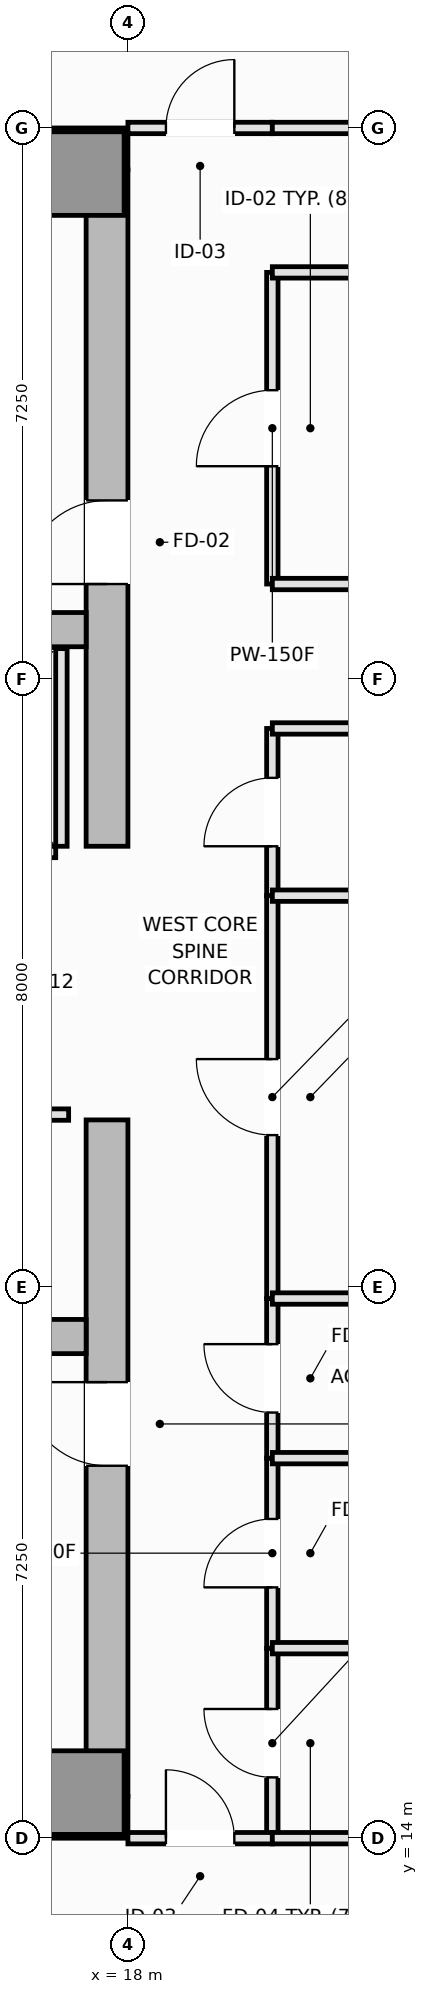
"""IFC4 building model, lengths in metres.
Left out: names, types, materials, properties, quantities, classifications, styles, units other than length and angle.
Written with IfcOpenShell. Run it as: python <this file> out.ifc"""

import sys

from ifc_helpers import new_model, si_unit, direction, frame, frame_2d, origin, origin_2d, place, context, subcontext, project, spatial, rectangle, extrude, element, fill, save


model = new_model("IFC4")
c1 = context("Model", 3, precision=1e-05, world=origin(), true_north=direction((0.0, 1.0)))
c2 = subcontext(c1, "Body", "Model", "MODEL_VIEW")
j1 = project(units=[si_unit("LENGTHUNIT", "METRE"), si_unit("PLANEANGLEUNIT", "RADIAN")], contexts=[c1])
p1 = place(None, origin())
s1 = spatial("IfcSite", under=j1, at=p1, CompositionType="ELEMENT")
p2 = place(p1, origin())
s2 = spatial("IfcBuilding", under=s1, at=p2, CompositionType="ELEMENT")
p3 = place(p2, frame((0.0, 0.0, 234.2)))
s3 = spatial("IfcBuildingStorey", under=s2, at=p3, CompositionType="ELEMENT", Elevation=234.2)
for number, where, z_axis, x_axis in (
    (1, (4.5, 14.275, 0.0), (0.0, 0.0, 1.0), (1.0, 0.0, 0.0)),
    (2, (4.5, 36.225, 0.0), (0.0, 0.0, 1.0), (1.0, 0.0, 0.0)),
):
    element("IfcWall", number, at=place(p3, frame(where, z_axis=z_axis, x_axis=x_axis)), inside=s3, PredefinedType="SHEAR", context=c2, shape_type="SweptSolid", body=[
        extrude(rectangle(XDim=13.5, YDim=0.55, at=frame_2d((6.75, 0.0))), origin(), (0.0, 0.0, 1.0), 3.55),
    ])
p4 = place(p3, frame((17.725, 14.55, 0.0), z_axis=(0.0, 0.0, 1.0), x_axis=(0.0, 1.0, 0.0)))
e3 = element("IfcWall", 3, at=p4, inside=s3, PredefinedType="SHEAR", context=c2, shape_type="SweptSolid", body=[
    extrude(rectangle(XDim=8.9, YDim=0.55, at=frame_2d((4.45, 0.0))), origin(), (0.0, 0.0, 1.0), 3.55),
])
p5 = place(p4, frame((4.35, 0.0, 0.0)))
e4 = element("IfcOpeningElement", 4, at=p5, cuts=e3, PredefinedType="OPENING", context=c2, shape_type="SweptSolid", body=[
    extrude(rectangle(XDim=1.1, YDim=2.15, at=frame_2d((0.55, 1.075))), frame((0.0, 0.285, 0.0), z_axis=(0.0, -1.0, 0.0), x_axis=(1.0, 0.0, 0.0)), (0.0, 0.0, 1.0), 0.57),
])
p6 = place(p3, frame((17.725, 27.05, 0.0), z_axis=(0.0, 0.0, 1.0), x_axis=(0.0, 1.0, 0.0)))
e5 = element("IfcWall", 5, at=p6, inside=s3, PredefinedType="SHEAR", context=c2, shape_type="SweptSolid", body=[
    extrude(rectangle(XDim=8.9, YDim=0.55, at=frame_2d((4.45, 0.0))), origin(), (0.0, 0.0, 1.0), 3.55),
])
p7 = place(p6, frame((3.45, 0.0, 0.0)))
e6 = element("IfcOpeningElement", 6, at=p7, cuts=e5, PredefinedType="OPENING", context=c2, shape_type="SweptSolid", body=[
    extrude(rectangle(XDim=1.1, YDim=2.15, at=frame_2d((0.55, 1.075))), frame((0.0, 0.285, 0.0), z_axis=(0.0, -1.0, 0.0), x_axis=(1.0, 0.0, 0.0)), (0.0, 0.0, 1.0), 0.57),
])
for number, where, z_axis, x_axis in (
    (7, (5.05, 20.6, 0.0), (0.0, 0.0, 1.0), (1.0, 0.0, 0.0)),
    (8, (5.05, 29.9, 0.0), (0.0, 0.0, 1.0), (1.0, 0.0, 0.0)),
):
    element("IfcWall", number, at=place(p3, frame(where, z_axis=z_axis, x_axis=x_axis)), inside=s3, PredefinedType="SHEAR", context=c2, shape_type="SweptSolid", body=[
        extrude(rectangle(XDim=12.4, YDim=0.45, at=frame_2d((6.2, 0.0))), origin(), (0.0, 0.0, 1.0), 3.55),
    ])
for number, where, z_axis, x_axis in (
    (9, (17.4, 14.6, 0.0), (0.0, 0.0, 1.0), (1.0, 0.0, 0.0)),
    (10, (17.4, 35.9, 0.0), (0.0, 0.0, 1.0), (1.0, 0.0, 0.0)),
):
    element("IfcColumn", number, at=place(p3, frame(where, z_axis=z_axis, x_axis=x_axis)), inside=s3, PredefinedType="PILASTER", context=c2, shape_type="SweptSolid", body=[
        extrude(rectangle(XDim=1.1, YDim=1.1, at=origin_2d()), origin(), (0.0, 0.0, 1.0), 3.55),
    ])
p8 = place(p3, frame((14.5, 26.975, 0.0), z_axis=(0.0, 0.0, 1.0), x_axis=(1.0, 0.0, 0.0)))
e11 = element("IfcWall", 11, at=p8, inside=s3, PredefinedType="PARTITIONING", context=c2, shape_type="SweptSolid", body=[
    extrude(rectangle(XDim=2.55, YDim=0.15, at=frame_2d((1.275, 0.0))), origin(), (0.0, 0.0, 1.0), 3.37),
])
p9 = place(p8, frame((0.625, 0.0, 0.0)))
e12 = element("IfcOpeningElement", 12, at=p9, cuts=e11, PredefinedType="OPENING", context=c2, shape_type="SweptSolid", body=[
    extrude(rectangle(XDim=1.3, YDim=2.2, at=frame_2d((0.65, 1.1))), frame((0.0, 0.085, 0.0), z_axis=(0.0, -1.0, 0.0), x_axis=(1.0, 0.0, 0.0)), (0.0, 0.0, 1.0), 0.17),
])
p10 = place(p3, frame((17.125, 27.05, 0.0), z_axis=(0.0, 0.0, 1.0), x_axis=(0.0, 1.0, 0.0)))
e13 = element("IfcWall", 13, at=p10, inside=s3, PredefinedType="PARTITIONING", context=c2, shape_type="SweptSolid", body=[
    extrude(rectangle(XDim=2.6, YDim=0.15, at=frame_2d((1.3, 0.0))), origin(), (0.0, 0.0, 1.0), 3.37),
])
p11 = place(p3, frame((16.05, 23.52, 0.0), z_axis=(0.0, 0.0, 1.0), x_axis=(1.0, 0.0, 0.0)))
e14 = element("IfcWall", 14, at=p11, inside=s3, PredefinedType="PARTITIONING", context=c2, shape_type="SweptSolid", body=[
    extrude(rectangle(XDim=1.17, YDim=0.15, at=frame_2d((0.585, 0.0))), origin(), (0.0, 0.0, 1.0), 3.37),
])
p12 = place(p3, frame((19.9, 30.5, 0.0), z_axis=(0.0, 0.0, 1.0), x_axis=(0.0, 1.0, 0.0)))
e15 = element("IfcWall", 15, at=p12, inside=s3, PredefinedType="PARTITIONING", context=c2, shape_type="SweptSolid", body=[
    extrude(rectangle(XDim=4.1, YDim=0.15, at=frame_2d((2.05, 0.0))), origin(), (0.0, 0.0, 1.0), 3.37),
])
p13 = place(p12, frame((1.55, 0.0, 0.0)))
e16 = element("IfcOpeningElement", 16, at=p13, cuts=e15, PredefinedType="OPENING", context=c2, shape_type="SweptSolid", body=[
    extrude(rectangle(XDim=1.0, YDim=2.15, at=frame_2d((0.5, 1.075))), frame((0.0, 0.085, 0.0), z_axis=(0.0, -1.0, 0.0), x_axis=(1.0, 0.0, 0.0)), (0.0, 0.0, 1.0), 0.17),
])
p14 = place(p3, frame((19.9, 14.0, 0.0), z_axis=(0.0, 0.0, 1.0), x_axis=(0.0, 1.0, 0.0)))
e17 = element("IfcWall", 17, at=p14, inside=s3, PredefinedType="PLUMBINGWALL", context=c2, shape_type="SweptSolid", body=[
    extrude(rectangle(XDim=2.5, YDim=0.15, at=frame_2d((1.25, 0.0))), origin(), (0.0, 0.0, 1.0), 3.37),
])
p15 = place(p14, frame((0.8, 0.0, 0.0)))
e18 = element("IfcOpeningElement", 18, at=p15, cuts=e17, PredefinedType="OPENING", context=c2, shape_type="SweptSolid", body=[
    extrude(rectangle(XDim=0.9, YDim=2.1, at=frame_2d((0.45, 1.05))), frame((0.0, 0.085, 0.0), z_axis=(0.0, -1.0, 0.0), x_axis=(1.0, 0.0, 0.0)), (0.0, 0.0, 1.0), 0.17),
])
p16 = place(p3, frame((19.9, 16.5, 0.0), z_axis=(0.0, 0.0, 1.0), x_axis=(0.0, 1.0, 0.0)))
e19 = element("IfcWall", 19, at=p16, inside=s3, PredefinedType="PLUMBINGWALL", context=c2, shape_type="SweptSolid", body=[
    extrude(rectangle(XDim=2.5, YDim=0.15, at=frame_2d((1.25, 0.0))), origin(), (0.0, 0.0, 1.0), 3.37),
])
p17 = place(p16, frame((0.8, 0.0, 0.0)))
e20 = element("IfcOpeningElement", 20, at=p17, cuts=e19, PredefinedType="OPENING", context=c2, shape_type="SweptSolid", body=[
    extrude(rectangle(XDim=0.9, YDim=2.1, at=frame_2d((0.45, 1.05))), frame((0.0, 0.085, 0.0), z_axis=(0.0, -1.0, 0.0), x_axis=(1.0, 0.0, 0.0)), (0.0, 0.0, 1.0), 0.17),
])
p18 = place(p3, frame((19.9, 19.0, 0.0), z_axis=(0.0, 0.0, 1.0), x_axis=(0.0, 1.0, 0.0)))
e21 = element("IfcWall", 21, at=p18, inside=s3, PredefinedType="PLUMBINGWALL", context=c2, shape_type="SweptSolid", body=[
    extrude(rectangle(XDim=2.1, YDim=0.15, at=frame_2d((1.05, 0.0))), origin(), (0.0, 0.0, 1.0), 3.37),
])
p19 = place(p18, frame((0.6, 0.0, 0.0)))
e22 = element("IfcOpeningElement", 22, at=p19, cuts=e21, PredefinedType="OPENING", context=c2, shape_type="SweptSolid", body=[
    extrude(rectangle(XDim=0.9, YDim=2.1, at=frame_2d((0.45, 1.05))), frame((0.0, 0.085, 0.0), z_axis=(0.0, -1.0, 0.0), x_axis=(1.0, 0.0, 0.0)), (0.0, 0.0, 1.0), 0.17),
])
p20 = place(p3, frame((19.9, 26.4, 0.0), z_axis=(0.0, 0.0, 1.0), x_axis=(0.0, 1.0, 0.0)))
e23 = element("IfcWall", 23, at=p20, inside=s3, PredefinedType="PLUMBINGWALL", context=c2, shape_type="SweptSolid", body=[
    extrude(rectangle(XDim=2.2, YDim=0.15, at=frame_2d((1.1, 0.0))), origin(), (0.0, 0.0, 1.0), 3.37),
])
p21 = place(p20, frame((0.65, 0.0, 0.0)))
e24 = element("IfcOpeningElement", 24, at=p21, cuts=e23, PredefinedType="OPENING", context=c2, shape_type="SweptSolid", body=[
    extrude(rectangle(XDim=0.9, YDim=2.1, at=frame_2d((0.45, 1.05))), frame((0.0, 0.085, 0.0), z_axis=(0.0, -1.0, 0.0), x_axis=(1.0, 0.0, 0.0)), (0.0, 0.0, 1.0), 0.17),
])
p22 = place(p3, frame((19.9, 21.1, 0.0), z_axis=(0.0, 0.0, 1.0), x_axis=(0.0, 1.0, 0.0)))
e25 = element("IfcWall", 25, at=p22, inside=s3, PredefinedType="PARTITIONING", context=c2, shape_type="SweptSolid", body=[
    extrude(rectangle(XDim=5.3, YDim=0.15, at=frame_2d((2.65, 0.0))), origin(), (0.0, 0.0, 1.0), 3.37),
])
p23 = place(p22, frame((2.15, 0.0, 0.0)))
e26 = element("IfcOpeningElement", 26, at=p23, cuts=e25, PredefinedType="OPENING", context=c2, shape_type="SweptSolid", body=[
    extrude(rectangle(XDim=1.0, YDim=2.15, at=frame_2d((0.5, 1.075))), frame((0.0, 0.085, 0.0), z_axis=(0.0, -1.0, 0.0), x_axis=(1.0, 0.0, 0.0)), (0.0, 0.0, 1.0), 0.17),
])
p24 = place(p3, frame((18.0, 14.0, 0.0), z_axis=(0.0, 0.0, 1.0), x_axis=(1.0, 0.0, 0.0)))
e27 = element("IfcWall", 27, at=p24, inside=s3, PredefinedType="PARTITIONING", context=c2, shape_type="SweptSolid", body=[
    extrude(rectangle(XDim=1.9, YDim=0.15, at=frame_2d((0.95, 0.0))), origin(), (0.0, 0.0, 1.0), 3.37),
])
p25 = place(p24, frame((0.5, 0.0, 0.0)))
e28 = element("IfcOpeningElement", 28, at=p25, cuts=e27, PredefinedType="OPENING", context=c2, shape_type="SweptSolid", body=[
    extrude(rectangle(XDim=0.9, YDim=2.1, at=frame_2d((0.45, 1.05))), frame((0.0, 0.085, 0.0), z_axis=(0.0, -1.0, 0.0), x_axis=(1.0, 0.0, 0.0)), (0.0, 0.0, 1.0), 0.17),
])
p26 = place(p3, frame((18.0, 36.5, 0.0), z_axis=(0.0, 0.0, 1.0), x_axis=(1.0, 0.0, 0.0)))
e29 = element("IfcWall", 29, at=p26, inside=s3, PredefinedType="PARTITIONING", context=c2, shape_type="SweptSolid", body=[
    extrude(rectangle(XDim=1.9, YDim=0.15, at=frame_2d((0.95, 0.0))), origin(), (0.0, 0.0, 1.0), 3.37),
])
p27 = place(p26, frame((0.5, 0.0, 0.0)))
e30 = element("IfcOpeningElement", 30, at=p27, cuts=e29, PredefinedType="OPENING", context=c2, shape_type="SweptSolid", body=[
    extrude(rectangle(XDim=0.9, YDim=2.1, at=frame_2d((0.45, 1.05))), frame((0.0, 0.085, 0.0), z_axis=(0.0, -1.0, 0.0), x_axis=(1.0, 0.0, 0.0)), (0.0, 0.0, 1.0), 0.17),
])
p28 = place(p3, frame((19.9, 30.5, 0.0), z_axis=(0.0, 0.0, 1.0), x_axis=(1.0, 0.0, 0.0)))
e31 = element("IfcWall", 31, at=p28, inside=s3, PredefinedType="PARTITIONING", context=c2, shape_type="SweptSolid", body=[
    extrude(rectangle(XDim=5.75, YDim=0.15, at=frame_2d((2.875, 0.0))), origin(), (0.0, 0.0, 1.0), 3.37),
])
p29 = place(p3, frame((19.9, 28.6, 0.0), z_axis=(0.0, 0.0, 1.0), x_axis=(1.0, 0.0, 0.0)))
e32 = element("IfcWall", 32, at=p29, inside=s3, PredefinedType="PLUMBINGWALL", context=c2, shape_type="SweptSolid", body=[
    extrude(rectangle(XDim=3.6, YDim=0.15, at=frame_2d((1.8, 0.0))), origin(), (0.0, 0.0, 1.0), 3.37),
])
p30 = place(p3, frame((19.9, 34.6, 0.0), z_axis=(0.0, 0.0, 1.0), x_axis=(1.0, 0.0, 0.0)))
e33 = element("IfcWall", 33, at=p30, inside=s3, PredefinedType="PARTITIONING", context=c2, shape_type="SweptSolid", body=[
    extrude(rectangle(XDim=5.75, YDim=0.15, at=frame_2d((2.875, 0.0))), origin(), (0.0, 0.0, 1.0), 3.37),
])
p31 = place(p3, frame((19.9, 36.5, 0.0), z_axis=(0.0, 0.0, 1.0), x_axis=(1.0, 0.0, 0.0)))
e34 = element("IfcWall", 34, at=p31, inside=s3, PredefinedType="PARTITIONING", context=c2, shape_type="SweptSolid", body=[
    extrude(rectangle(XDim=7.6, YDim=0.15, at=frame_2d((3.8, 0.0))), origin(), (0.0, 0.0, 1.0), 3.37),
])
for number, where, z_axis, x_axis in (
    (35, (19.9, 16.5, 0.0), (0.0, 0.0, 1.0), (1.0, 0.0, 0.0)),
    (36, (19.9, 14.0, 0.0), (0.0, 0.0, 1.0), (1.0, 0.0, 0.0)),
    (37, (19.9, 19.0, 0.0), (0.0, 0.0, 1.0), (1.0, 0.0, 0.0)),
    (38, (19.9, 21.1, 0.0), (0.0, 0.0, 1.0), (1.0, 0.0, 0.0)),
    (39, (19.9, 26.4, 0.0), (0.0, 0.0, 1.0), (1.0, 0.0, 0.0)),
):
    element("IfcWall", number, at=place(p3, frame(where, z_axis=z_axis, x_axis=x_axis)), inside=s3, PredefinedType="PLUMBINGWALL", context=c2, shape_type="SweptSolid", body=[
        extrude(rectangle(XDim=3.6, YDim=0.15, at=frame_2d((1.8, 0.0))), origin(), (0.0, 0.0, 1.0), 3.37),
    ])
p32 = place(p5, origin())
e40 = element("IfcDoor", 40, at=p32, inside=s3, OperationType="SINGLE_SWING_RIGHT", PredefinedType="DOOR", context=c2, shape_type="SweptSolid", body=[
    extrude(rectangle(XDim=1.1, YDim=2.15, at=frame_2d((0.55, 1.075))), frame((0.0, 0.025, 0.0), z_axis=(0.0, -1.0, 0.0), x_axis=(1.0, 0.0, 0.0)), (0.0, 0.0, 1.0), 0.05),
])
fill(e4, e40)
p33 = place(p7, origin())
e41 = element("IfcDoor", 41, at=p33, inside=s3, OperationType="SINGLE_SWING_LEFT", PredefinedType="DOOR", context=c2, shape_type="SweptSolid", body=[
    extrude(rectangle(XDim=1.1, YDim=2.15, at=frame_2d((0.55, 1.075))), frame((0.0, 0.025, 0.0), z_axis=(0.0, -1.0, 0.0), x_axis=(1.0, 0.0, 0.0)), (0.0, 0.0, 1.0), 0.05),
])
fill(e6, e41)
p34 = place(p13, origin())
e42 = element("IfcDoor", 42, at=p34, inside=s3, OperationType="SINGLE_SWING_LEFT", PredefinedType="DOOR", context=c2, shape_type="SweptSolid", body=[
    extrude(rectangle(XDim=1.0, YDim=2.15, at=frame_2d((0.5, 1.075))), frame((0.0, 0.025, 0.0), z_axis=(0.0, -1.0, 0.0), x_axis=(1.0, 0.0, 0.0)), (0.0, 0.0, 1.0), 0.05),
])
fill(e16, e42)
p35 = place(p15, origin())
e43 = element("IfcDoor", 43, at=p35, inside=s3, OperationType="SINGLE_SWING_RIGHT", PredefinedType="DOOR", context=c2, shape_type="SweptSolid", body=[
    extrude(rectangle(XDim=0.9, YDim=2.1, at=frame_2d((0.45, 1.05))), frame((0.0, 0.025, 0.0), z_axis=(0.0, -1.0, 0.0), x_axis=(1.0, 0.0, 0.0)), (0.0, 0.0, 1.0), 0.05),
])
fill(e18, e43)
p36 = place(p17, origin())
e44 = element("IfcDoor", 44, at=p36, inside=s3, OperationType="SINGLE_SWING_LEFT", PredefinedType="DOOR", context=c2, shape_type="SweptSolid", body=[
    extrude(rectangle(XDim=0.9, YDim=2.1, at=frame_2d((0.45, 1.05))), frame((0.0, 0.025, 0.0), z_axis=(0.0, -1.0, 0.0), x_axis=(1.0, 0.0, 0.0)), (0.0, 0.0, 1.0), 0.05),
])
fill(e20, e44)
p37 = place(p19, origin())
e45 = element("IfcDoor", 45, at=p37, inside=s3, OperationType="SINGLE_SWING_RIGHT", PredefinedType="DOOR", context=c2, shape_type="SweptSolid", body=[
    extrude(rectangle(XDim=0.9, YDim=2.1, at=frame_2d((0.45, 1.05))), frame((0.0, 0.025, 0.0), z_axis=(0.0, -1.0, 0.0), x_axis=(1.0, 0.0, 0.0)), (0.0, 0.0, 1.0), 0.05),
])
fill(e22, e45)
p38 = place(p21, origin())
e46 = element("IfcDoor", 46, at=p38, inside=s3, OperationType="SINGLE_SWING_LEFT", PredefinedType="DOOR", context=c2, shape_type="SweptSolid", body=[
    extrude(rectangle(XDim=0.9, YDim=2.1, at=frame_2d((0.45, 1.05))), frame((0.0, 0.025, 0.0), z_axis=(0.0, -1.0, 0.0), x_axis=(1.0, 0.0, 0.0)), (0.0, 0.0, 1.0), 0.05),
])
fill(e24, e46)
p39 = place(p23, origin())
e47 = element("IfcDoor", 47, at=p39, inside=s3, OperationType="SINGLE_SWING_RIGHT", PredefinedType="DOOR", context=c2, shape_type="SweptSolid", body=[
    extrude(rectangle(XDim=1.0, YDim=2.15, at=frame_2d((0.5, 1.075))), frame((0.0, 0.025, 0.0), z_axis=(0.0, -1.0, 0.0), x_axis=(1.0, 0.0, 0.0)), (0.0, 0.0, 1.0), 0.05),
])
fill(e26, e47)
p40 = place(p25, origin())
e48 = element("IfcDoor", 48, at=p40, inside=s3, OperationType="SINGLE_SWING_LEFT", PredefinedType="DOOR", context=c2, shape_type="SweptSolid", body=[
    extrude(rectangle(XDim=0.9, YDim=2.1, at=frame_2d((0.45, 1.05))), frame((0.0, 0.025, 0.0), z_axis=(0.0, -1.0, 0.0), x_axis=(1.0, 0.0, 0.0)), (0.0, 0.0, 1.0), 0.05),
])
fill(e28, e48)
p41 = place(p27, origin())
e49 = element("IfcDoor", 49, at=p41, inside=s3, OperationType="SINGLE_SWING_RIGHT", PredefinedType="DOOR", context=c2, shape_type="SweptSolid", body=[
    extrude(rectangle(XDim=0.9, YDim=2.1, at=frame_2d((0.45, 1.05))), frame((0.0, 0.025, 0.0), z_axis=(0.0, -1.0, 0.0), x_axis=(1.0, 0.0, 0.0)), (0.0, 0.0, 1.0), 0.05),
])
fill(e30, e49)
save(model, sys.argv[1])
